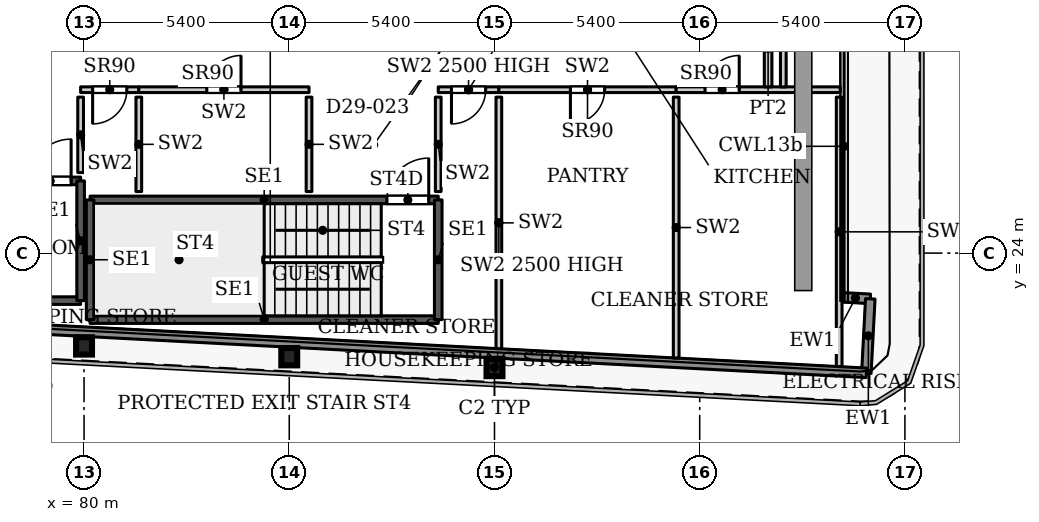
"""IFC4 building model, lengths in metres.
Left out: names, types, materials, properties, quantities, classifications, styles, units other than length and angle.
Written with IfcOpenShell. Run it as: python <this file> out.ifc"""

import sys

from ifc_helpers import new_model, si_unit, direction, frame, frame_2d, origin, origin_2d, place, context, subcontext, project, spatial, rectangle, i_section, extrude, source, transform, mapped, element, fill, save


model = new_model("IFC4")
c1 = context("Model", 3, precision=1e-05, world=origin(), true_north=direction((0.0, 1.0)))
c2 = subcontext(c1, "Body", "Model", "MODEL_VIEW")
j1 = project(units=[si_unit("LENGTHUNIT", "METRE"), si_unit("PLANEANGLEUNIT", "RADIAN")], contexts=[c1])
p1 = place(None, origin())
s1 = spatial("IfcSite", under=j1, at=p1, CompositionType="ELEMENT")
p2 = place(p1, origin())
s2 = spatial("IfcBuilding", under=s1, at=p2, CompositionType="ELEMENT")
p3 = place(p2, frame((0.0, 0.0, 129.2)))
s3 = spatial("IfcBuildingStorey", under=s2, at=p3, CompositionType="ELEMENT", Elevation=129.2)
for number, where, z_axis, x_axis in (
    (1, (90.8, 20.99, 0.0), (0.0, 0.0, 1.0), (1.0, 0.0, 0.0)),
    (2, (85.4, 21.274, 0.0), (0.0, 0.0, 1.0), (1.0, 0.0, 0.0)),
    (3, (80.0, 21.558, 0.0), (0.0, 0.0, 1.0), (1.0, 0.0, 0.0)),
):
    element("IfcColumn", number, at=place(p3, frame(where, z_axis=z_axis, x_axis=x_axis)), inside=s3, PredefinedType="COLUMN", context=c2, shape_type="SweptSolid", body=[
        extrude(i_section(OverallWidth=0.418, OverallDepth=0.455, WebThickness=0.042, FlangeThickness=0.068, FilletRadius=0.014, at=origin_2d()), origin(), (0.0, 0.0, 1.0), 3.9),
    ])
p4 = place(p3, frame((99.907, 22.839, 0.0), z_axis=(0.0, 0.0, 1.0), x_axis=(0.998561284263, -0.053622398031, 0.0)))
e4 = element("IfcWall", 4, at=p4, inside=s3, PredefinedType="SOLIDWALL", context=c2, shape_type="SweptSolid", body=[
    extrude(rectangle(XDim=0.783, YDim=0.25, at=frame_2d((0.392, 0.0))), origin(), (0.0, 0.0, 1.0), 3.75),
])
p5 = place(p3, frame((100.689, 22.797, 0.0), z_axis=(0.0, 0.0, 1.0), x_axis=(-0.052841433274, -0.998602915542, 0.0)))
e5 = element("IfcWall", 5, at=p5, inside=s3, PredefinedType="SOLIDWALL", context=c2, shape_type="SweptSolid", body=[
    extrude(rectangle(XDim=1.95, YDim=0.25, at=frame_2d((0.975, 0.0))), origin(), (0.0, 0.0, 1.0), 3.75),
])
p6 = place(p3, frame((100.586, 20.85, 0.0), z_axis=(0.0, 0.0, 1.0), x_axis=(-0.99861746497, 0.052565755559, 0.0)))
e6 = element("IfcWall", 6, at=p6, inside=s3, PredefinedType="SOLIDWALL", context=c2, shape_type="SweptSolid", body=[
    extrude(rectangle(XDim=66.639, YDim=0.25, at=frame_2d((33.319, 0.0))), origin(), (0.0, 0.0, 1.0), 3.75),
])
p7 = place(p3, frame((80.16, 22.25, 0.0), z_axis=(0.0, 0.0, 1.0), x_axis=(1.0, 0.0, 0.0)))
e7 = element("IfcWall", 7, at=p7, inside=s3, PredefinedType="SHEAR", context=c2, shape_type="SweptSolid", body=[
    extrude(rectangle(XDim=9.16, YDim=0.2, at=frame_2d((4.58, 0.0))), origin(), (0.0, 0.0, 1.0), 3.9),
])
p8 = place(p3, frame((80.16, 25.4, 0.0), z_axis=(0.0, 0.0, 1.0), x_axis=(1.0, 0.0, 0.0)))
e8 = element("IfcWall", 8, at=p8, inside=s3, PredefinedType="SHEAR", context=c2, shape_type="SweptSolid", body=[
    extrude(rectangle(XDim=9.16, YDim=0.2, at=frame_2d((4.58, 0.0))), origin(), (0.0, 0.0, 1.0), 3.9),
])
p9 = place(p8, frame((7.81, 0.0, 0.0)))
e9 = element("IfcOpeningElement", 9, at=p9, cuts=e8, PredefinedType="OPENING", context=c2, shape_type="SweptSolid", body=[
    extrude(rectangle(XDim=1.1, YDim=2.2, at=frame_2d((0.55, 1.1))), frame((0.0, 0.11, 0.0), z_axis=(0.0, -1.0, 0.0), x_axis=(1.0, 0.0, 0.0)), (0.0, 0.0, 1.0), 0.22),
])
for number, where, z_axis, x_axis in (
    (10, (80.16, 22.25, 0.0), (0.0, 0.0, 1.0), (0.0, 1.0, 0.0)),
    (11, (89.32, 22.25, 0.0), (0.0, 0.0, 1.0), (0.0, 1.0, 0.0)),
):
    element("IfcWall", number, at=place(p3, frame(where, z_axis=z_axis, x_axis=x_axis)), inside=s3, PredefinedType="SHEAR", context=c2, shape_type="SweptSolid", body=[
        extrude(rectangle(XDim=3.15, YDim=0.2, at=frame_2d((1.575, 0.0))), origin(), (0.0, 0.0, 1.0), 3.9),
    ])
p10 = place(p3, frame((70.75, 22.75, 0.0), z_axis=(0.0, 0.0, 1.0), x_axis=(1.0, 0.0, 0.0)))
e12 = element("IfcWall", 12, at=p10, inside=s3, PredefinedType="SHEAR", context=c2, shape_type="SweptSolid", body=[
    extrude(rectangle(XDim=9.16, YDim=0.2, at=frame_2d((4.58, 0.0))), origin(), (0.0, 0.0, 1.0), 3.9),
])
p11 = place(p3, frame((70.75, 25.9, 0.0), z_axis=(0.0, 0.0, 1.0), x_axis=(1.0, 0.0, 0.0)))
e13 = element("IfcWall", 13, at=p11, inside=s3, PredefinedType="SHEAR", context=c2, shape_type="SweptSolid", body=[
    extrude(rectangle(XDim=9.16, YDim=0.2, at=frame_2d((4.58, 0.0))), origin(), (0.0, 0.0, 1.0), 3.9),
])
p12 = place(p11, frame((7.81, 0.0, 0.0)))
e14 = element("IfcOpeningElement", 14, at=p12, cuts=e13, PredefinedType="OPENING", context=c2, shape_type="SweptSolid", body=[
    extrude(rectangle(XDim=1.1, YDim=2.2, at=frame_2d((0.55, 1.1))), frame((0.0, 0.11, 0.0), z_axis=(0.0, -1.0, 0.0), x_axis=(1.0, 0.0, 0.0)), (0.0, 0.0, 1.0), 0.22),
])
p13 = place(p3, frame((79.91, 22.75, 0.0), z_axis=(0.0, 0.0, 1.0), x_axis=(0.0, 1.0, 0.0)))
e15 = element("IfcWall", 15, at=p13, inside=s3, PredefinedType="SHEAR", context=c2, shape_type="SweptSolid", body=[
    extrude(rectangle(XDim=3.15, YDim=0.2, at=frame_2d((1.575, 0.0))), origin(), (0.0, 0.0, 1.0), 3.9),
])
p14 = place(p3, frame((79.91, 28.3, 0.0), z_axis=(0.0, 0.0, 1.0), x_axis=(1.0, 0.0, 0.0)))
e16 = element("IfcWall", 16, at=p14, inside=s3, PredefinedType="PARTITIONING", context=c2, shape_type="SweptSolid", body=[
    extrude(rectangle(XDim=1.531, YDim=0.15, at=frame_2d((0.766, 0.0))), origin(), (0.0, 0.0, 1.0), 3.9),
])
p15 = place(p14, frame((0.316, 0.0, 0.0)))
e17 = element("IfcOpeningElement", 17, at=p15, cuts=e16, PredefinedType="OPENING", context=c2, shape_type="SweptSolid", body=[
    extrude(rectangle(XDim=0.9, YDim=2.2, at=frame_2d((0.45, 1.1))), frame((0.0, 0.085, 0.0), z_axis=(0.0, -1.0, 0.0), x_axis=(1.0, 0.0, 0.0)), (0.0, 0.0, 1.0), 0.17),
])
p16 = place(p3, frame((79.91, 26.12, 0.0), z_axis=(0.0, 0.0, 1.0), x_axis=(0.0, 1.0, 0.0)))
e18 = element("IfcWall", 18, at=p16, inside=s3, PredefinedType="PARTITIONING", context=c2, shape_type="SweptSolid", body=[
    extrude(rectangle(XDim=1.985, YDim=0.15, at=frame_2d((0.992, 0.0))), origin(), (0.0, 0.0, 1.0), 3.9),
])
p17 = place(p3, frame((81.441, 25.62, 0.0), z_axis=(0.0, 0.0, 1.0), x_axis=(0.0, 1.0, 0.0)))
e19 = element("IfcWall", 19, at=p17, inside=s3, PredefinedType="PARTITIONING", context=c2, shape_type="SweptSolid", body=[
    extrude(rectangle(XDim=2.485, YDim=0.15, at=frame_2d((1.242, 0.0))), origin(), (0.0, 0.0, 1.0), 3.9),
])
p18 = place(p3, frame((81.441, 28.3, 0.0), z_axis=(0.0, 0.0, 1.0), x_axis=(1.0, 0.0, 0.0)))
e20 = element("IfcWall", 20, at=p18, inside=s3, PredefinedType="PARTITIONING", context=c2, shape_type="SweptSolid", body=[
    extrude(rectangle(XDim=4.479, YDim=0.15, at=frame_2d((2.24, 0.0))), origin(), (0.0, 0.0, 1.0), 3.9),
])
p19 = place(p18, frame((1.789, 0.0, 0.0)))
e21 = element("IfcOpeningElement", 21, at=p19, cuts=e20, PredefinedType="OPENING", context=c2, shape_type="SweptSolid", body=[
    extrude(rectangle(XDim=0.9, YDim=2.2, at=frame_2d((0.45, 1.1))), frame((0.0, 0.085, 0.0), z_axis=(0.0, -1.0, 0.0), x_axis=(1.0, 0.0, 0.0)), (0.0, 0.0, 1.0), 0.17),
])
p20 = place(p3, frame((85.92, 25.62, 0.0), z_axis=(0.0, 0.0, 1.0), x_axis=(0.0, 1.0, 0.0)))
e22 = element("IfcWall", 22, at=p20, inside=s3, PredefinedType="PARTITIONING", context=c2, shape_type="SweptSolid", body=[
    extrude(rectangle(XDim=2.485, YDim=0.15, at=frame_2d((1.242, 0.0))), origin(), (0.0, 0.0, 1.0), 3.9),
])
p21 = place(p3, frame((89.32, 28.3, 0.0), z_axis=(0.0, 0.0, 1.0), x_axis=(1.0, 0.0, 0.0)))
e23 = element("IfcWall", 23, at=p21, inside=s3, PredefinedType="PARTITIONING", context=c2, shape_type="SweptSolid", body=[
    extrude(rectangle(XDim=1.595, YDim=0.15, at=frame_2d((0.797, 0.0))), origin(), (0.0, 0.0, 1.0), 2.5),
])
p22 = place(p21, frame((0.348, 0.0, 0.0)))
e24 = element("IfcOpeningElement", 24, at=p22, cuts=e23, PredefinedType="OPENING", context=c2, shape_type="SweptSolid", body=[
    extrude(rectangle(XDim=0.9, YDim=2.2, at=frame_2d((0.45, 1.1))), frame((0.0, 0.085, 0.0), z_axis=(0.0, -1.0, 0.0), x_axis=(1.0, 0.0, 0.0)), (0.0, 0.0, 1.0), 0.17),
])
p23 = place(p3, frame((89.32, 25.62, 0.0), z_axis=(0.0, 0.0, 1.0), x_axis=(0.0, 1.0, 0.0)))
e25 = element("IfcWall", 25, at=p23, inside=s3, PredefinedType="PARTITIONING", context=c2, shape_type="SweptSolid", body=[
    extrude(rectangle(XDim=2.485, YDim=0.15, at=frame_2d((1.242, 0.0))), origin(), (0.0, 0.0, 1.0), 3.9),
])
p24 = place(p3, frame((90.915, 21.487, 0.0), z_axis=(0.0, 0.0, 1.0), x_axis=(0.0, 1.0, 0.0)))
e26 = element("IfcWall", 26, at=p24, inside=s3, PredefinedType="PARTITIONING", context=c2, shape_type="SweptSolid", body=[
    extrude(rectangle(XDim=6.618, YDim=0.15, at=frame_2d((3.309, 0.0))), origin(), (0.0, 0.0, 1.0), 2.5),
])
p25 = place(p3, frame((90.915, 28.3, 0.0), z_axis=(0.0, 0.0, 1.0), x_axis=(1.0, 0.0, 0.0)))
e27 = element("IfcWall", 27, at=p25, inside=s3, PredefinedType="PARTITIONING", context=c2, shape_type="SweptSolid", body=[
    extrude(rectangle(XDim=4.666, YDim=0.15, at=frame_2d((2.333, 0.0))), origin(), (0.0, 0.0, 1.0), 3.9),
])
p26 = place(p25, frame((1.883, 0.0, 0.0)))
e28 = element("IfcOpeningElement", 28, at=p26, cuts=e27, PredefinedType="OPENING", context=c2, shape_type="SweptSolid", body=[
    extrude(rectangle(XDim=0.9, YDim=2.2, at=frame_2d((0.45, 1.1))), frame((0.0, 0.085, 0.0), z_axis=(0.0, -1.0, 0.0), x_axis=(1.0, 0.0, 0.0)), (0.0, 0.0, 1.0), 0.17),
])
p27 = place(p3, frame((95.581, 21.241, 0.0), z_axis=(0.0, 0.0, 1.0), x_axis=(0.0, 1.0, 0.0)))
e29 = element("IfcWall", 29, at=p27, inside=s3, PredefinedType="PARTITIONING", context=c2, shape_type="SweptSolid", body=[
    extrude(rectangle(XDim=6.864, YDim=0.15, at=frame_2d((3.432, 0.0))), origin(), (0.0, 0.0, 1.0), 3.9),
])
p28 = place(p3, frame((95.581, 28.3, 0.0), z_axis=(0.0, 0.0, 1.0), x_axis=(1.0, 0.0, 0.0)))
e30 = element("IfcWall", 30, at=p28, inside=s3, PredefinedType="PARTITIONING", context=c2, shape_type="SweptSolid", body=[
    extrude(rectangle(XDim=4.317, YDim=0.15, at=frame_2d((2.158, 0.0))), origin(), (0.0, 0.0, 1.0), 3.9),
])
p29 = place(p28, frame((0.759, 0.0, 0.0)))
e31 = element("IfcOpeningElement", 31, at=p29, cuts=e30, PredefinedType="OPENING", context=c2, shape_type="SweptSolid", body=[
    extrude(rectangle(XDim=0.9, YDim=2.2, at=frame_2d((0.45, 1.1))), frame((0.0, 0.085, 0.0), z_axis=(0.0, -1.0, 0.0), x_axis=(1.0, 0.0, 0.0)), (0.0, 0.0, 1.0), 0.17),
])
p30 = place(p3, frame((99.87, 21.015, 0.0), z_axis=(0.0, 0.0, 1.0), x_axis=(0.0, 1.0, 0.0)))
e32 = element("IfcWall", 32, at=p30, inside=s3, PredefinedType="PARTITIONING", context=c2, shape_type="SweptSolid", body=[
    extrude(rectangle(XDim=7.09, YDim=0.15, at=frame_2d((3.545, 0.0))), origin(), (0.0, 0.0, 1.0), 3.9),
])
p31 = place(p3, frame((98.0, 28.374, 0.0), z_axis=(0.0, 0.0, 1.0), x_axis=(0.0, 1.0, 0.0)))
e33 = element("IfcWall", 33, at=p31, inside=s3, PredefinedType="PARTITIONING", context=c2, shape_type="SweptSolid", body=[
    extrude(rectangle(XDim=2.026, YDim=0.2, at=frame_2d((1.013, 0.0))), origin(), (0.0, 0.0, 1.0), 3.6),
])
p32 = place(p3, frame((98.4, 28.374, 0.0), z_axis=(0.0, 0.0, 1.0), x_axis=(0.0, 1.0, 0.0)))
e34 = element("IfcWall", 34, at=p32, inside=s3, PredefinedType="PARTITIONING", context=c2, shape_type="SweptSolid", body=[
    extrude(rectangle(XDim=5.251, YDim=0.15, at=frame_2d((2.625, 0.0))), origin(), (0.0, 0.0, 1.0), 3.6),
])
m1 = source(origin(), c2, "Body", "SweptSolid", [
    extrude(rectangle(XDim=0.9, YDim=2.2, at=frame_2d((0.45, 1.1))), frame((0.0, 0.025, 0.0), z_axis=(0.0, -1.0, 0.0), x_axis=(1.0, 0.0, 0.0)), (0.0, 0.0, 1.0), 0.05),
])
p33 = place(p15, origin())
e35 = element("IfcDoor", 35, at=p33, inside=s3, OperationType="SINGLE_SWING_RIGHT", PredefinedType="DOOR", context=c2, shape_type="MappedRepresentation", body=[
    mapped(m1, transform((0.0, 0.0, 0.0), x_axis=(1.0, 0.0, 0.0), y_axis=(0.0, 1.0, 0.0), z_axis=(0.0, 0.0, 1.0), scale=1.0)),
])
fill(e17, e35)
p34 = place(p19, origin())
e36 = element("IfcDoor", 36, at=p34, inside=s3, OperationType="SINGLE_SWING_LEFT", PredefinedType="DOOR", context=c2, shape_type="MappedRepresentation", body=[
    mapped(m1, transform((0.0, 0.0, 0.0), x_axis=(1.0, 0.0, 0.0), y_axis=(0.0, 1.0, 0.0), z_axis=(0.0, 0.0, 1.0), scale=1.0)),
])
fill(e21, e36)
p35 = place(p22, origin())
e37 = element("IfcDoor", 37, at=p35, inside=s3, OperationType="SINGLE_SWING_RIGHT", PredefinedType="DOOR", context=c2, shape_type="MappedRepresentation", body=[
    mapped(m1, transform((0.0, 0.0, 0.0), x_axis=(1.0, 0.0, 0.0), y_axis=(0.0, 1.0, 0.0), z_axis=(0.0, 0.0, 1.0), scale=1.0)),
])
fill(e24, e37)
p36 = place(p26, origin())
e38 = element("IfcDoor", 38, at=p36, inside=s3, OperationType="SINGLE_SWING_RIGHT", PredefinedType="DOOR", context=c2, shape_type="MappedRepresentation", body=[
    mapped(m1, transform((0.0, 0.0, 0.0), x_axis=(1.0, 0.0, 0.0), y_axis=(0.0, 1.0, 0.0), z_axis=(0.0, 0.0, 1.0), scale=1.0)),
])
fill(e28, e38)
p37 = place(p29, origin())
e39 = element("IfcDoor", 39, at=p37, inside=s3, OperationType="SINGLE_SWING_LEFT", PredefinedType="DOOR", context=c2, shape_type="MappedRepresentation", body=[
    mapped(m1, transform((0.0, 0.0, 0.0), x_axis=(1.0, 0.0, 0.0), y_axis=(0.0, 1.0, 0.0), z_axis=(0.0, 0.0, 1.0), scale=1.0)),
])
fill(e31, e39)
m2 = source(origin(), c2, "Body", "SweptSolid", [
    extrude(rectangle(XDim=1.1, YDim=2.2, at=frame_2d((0.55, 1.1))), frame((0.0, 0.025, 0.0), z_axis=(0.0, -1.0, 0.0), x_axis=(1.0, 0.0, 0.0)), (0.0, 0.0, 1.0), 0.05),
])
p38 = place(p9, origin())
e40 = element("IfcDoor", 40, at=p38, inside=s3, OperationType="SINGLE_SWING_LEFT", PredefinedType="DOOR", context=c2, shape_type="MappedRepresentation", body=[
    mapped(m2, transform((0.0, 0.0, 0.0), x_axis=(1.0, 0.0, 0.0), y_axis=(0.0, 1.0, 0.0), z_axis=(0.0, 0.0, 1.0), scale=1.0)),
])
fill(e9, e40)
p39 = place(p12, origin())
e41 = element("IfcDoor", 41, at=p39, inside=s3, OperationType="SINGLE_SWING_LEFT", PredefinedType="DOOR", context=c2, shape_type="MappedRepresentation", body=[
    mapped(m2, transform((0.0, 0.0, 0.0), x_axis=(1.0, 0.0, 0.0), y_axis=(0.0, 1.0, 0.0), z_axis=(0.0, 0.0, 1.0), scale=1.0)),
])
fill(e14, e41)
save(model, sys.argv[1])
